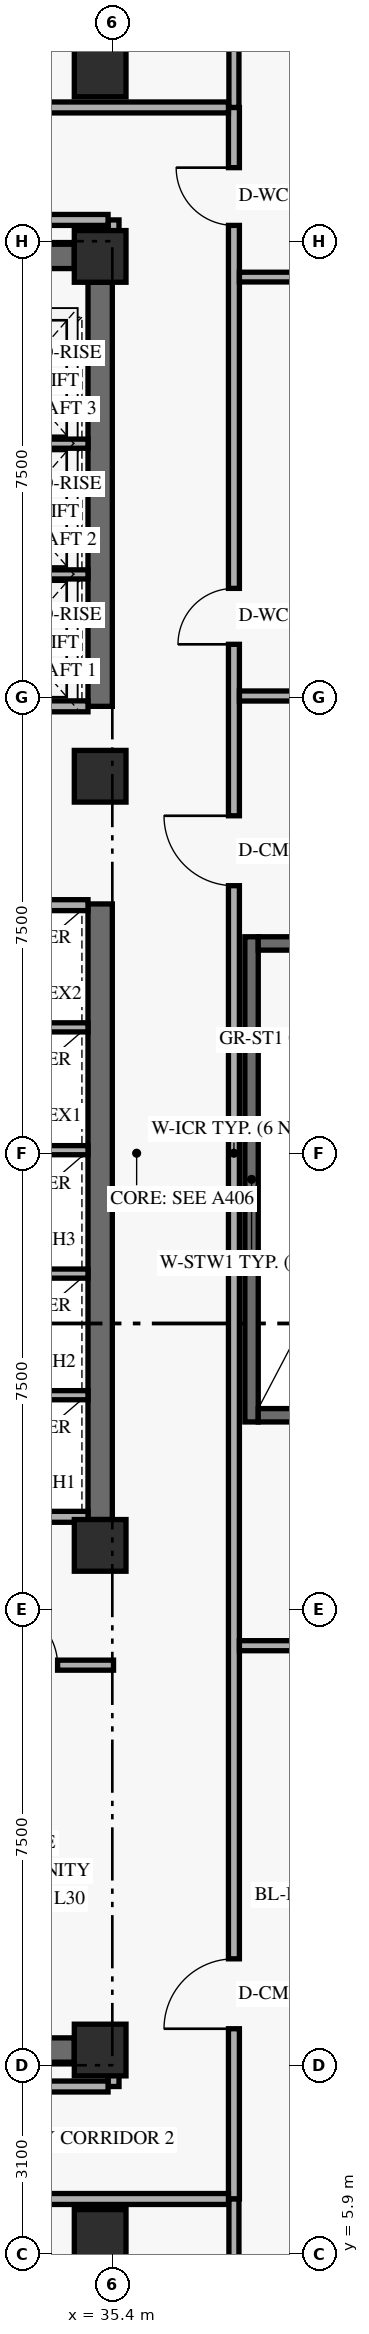
"""IFC4 building model, lengths in metres.
Left out: names, types, materials, properties, quantities, classifications, styles, units other than length and angle.
Written with IfcOpenShell. Run it as: python <this file> out.ifc"""

import sys

from ifc_helpers import new_model, si_unit, direction, frame, frame_2d, origin, origin_2d, place, context, subcontext, project, spatial, rectangle, extrude, element, fill, save


model = new_model("IFC4")
c1 = context("Model", 3, precision=1e-05, world=origin(), true_north=direction((0.0, 1.0)))
c2 = subcontext(c1, "Body", "Model", "MODEL_VIEW")
j1 = project(units=[si_unit("LENGTHUNIT", "METRE"), si_unit("PLANEANGLEUNIT", "RADIAN")], contexts=[c1])
p1 = place(None, origin())
s1 = spatial("IfcSite", under=j1, at=p1, CompositionType="ELEMENT")
p2 = place(p1, origin())
s2 = spatial("IfcBuilding", under=s1, at=p2, CompositionType="ELEMENT")
p3 = place(p2, frame((0.0, 0.0, 117.0)))
s3 = spatial("IfcBuildingStorey", under=s2, at=p3, CompositionType="ELEMENT", Elevation=117.0)
p4 = place(p3, frame((35.2, 17.975, 0.0), z_axis=(0.0, 0.0, 1.0), x_axis=(0.0, 1.0, 0.0)))
e1 = element("IfcWall", 1, at=p4, inside=s3, PredefinedType="SHEAR", context=c2, shape_type="SweptSolid", body=[
    extrude(rectangle(XDim=10.125, YDim=0.4, at=frame_2d((5.062, 0.0))), origin(), (0.0, 0.0, 1.0), 3.349),
])
p5 = place(p3, frame((35.2, 31.35, 0.0), z_axis=(0.0, 0.0, 1.0), x_axis=(0.0, 1.0, 0.0)))
e2 = element("IfcWall", 2, at=p5, inside=s3, PredefinedType="SHEAR", context=c2, shape_type="SweptSolid", body=[
    extrude(rectangle(XDim=6.975, YDim=0.4, at=frame_2d((3.487, 0.0))), origin(), (0.0, 0.0, 1.0), 3.349),
])
for number, where, z_axis, x_axis in (
    (3, (24.625, 9.25, 0.0), (0.0, 0.0, 1.0), (1.0, 0.0, 0.0)),
    (4, (24.625, 38.75, 0.0), (0.0, 0.0, 1.0), (1.0, 0.0, 0.0)),
):
    element("IfcWall", number, at=place(p3, frame(where, z_axis=z_axis, x_axis=x_axis)), inside=s3, PredefinedType="SHEAR", context=c2, shape_type="SweptSolid", body=[
        extrude(rectangle(XDim=10.15, YDim=0.4, at=frame_2d((5.075, 0.0))), origin(), (0.0, 0.0, 1.0), 3.96),
    ])
p6 = place(p3, frame((37.69, 19.58, 0.0), z_axis=(0.0, 0.0, 1.0), x_axis=(0.0, 1.0, 0.0)))
e5 = element("IfcWall", 5, at=p6, inside=s3, PredefinedType="SHEAR", context=c2, shape_type="SweptSolid", body=[
    extrude(rectangle(XDim=7.98, YDim=0.22, at=frame_2d((3.99, 0.0))), origin(), (0.0, 0.0, 1.0), 3.96),
])
p7 = place(p3, frame((37.8, 19.69, 0.0), z_axis=(0.0, 0.0, 1.0), x_axis=(1.0, 0.0, 0.0)))
e6 = element("IfcWall", 6, at=p7, inside=s3, PredefinedType="SHEAR", context=c2, shape_type="SweptSolid", body=[
    extrude(rectangle(XDim=3.16, YDim=0.22, at=frame_2d((1.58, 0.0))), origin(), (0.0, 0.0, 1.0), 3.96),
])
p8 = place(p3, frame((37.8, 27.45, 0.0), z_axis=(0.0, 0.0, 1.0), x_axis=(1.0, 0.0, 0.0)))
e7 = element("IfcWall", 7, at=p8, inside=s3, PredefinedType="SHEAR", context=c2, shape_type="SweptSolid", body=[
    extrude(rectangle(XDim=3.16, YDim=0.22, at=frame_2d((1.58, 0.0))), origin(), (0.0, 0.0, 1.0), 3.96),
])
p9 = place(p8, frame((0.85, 0.0, 0.0)))
e8 = element("IfcOpeningElement", 8, at=p9, cuts=e7, PredefinedType="OPENING", context=c2, shape_type="SweptSolid", body=[
    extrude(rectangle(XDim=1.05, YDim=2.15, at=frame_2d((0.525, 1.075))), frame((0.0, 0.12, 0.0), z_axis=(0.0, -1.0, 0.0), x_axis=(1.0, 0.0, 0.0)), (0.0, 0.0, 1.0), 0.24),
])
for number, where, z_axis, x_axis in (
    (9, (35.2, 6.2, 0.0), (0.0, 0.0, 1.0), (1.0, 0.0, 0.0)),
    (10, (35.2, 9.25, 0.0), (0.0, 0.0, 1.0), (1.0, 0.0, 0.0)),
    (11, (35.2, 17.55, 0.0), (0.0, 0.0, 1.0), (1.0, 0.0, 0.0)),
    (12, (35.2, 30.2, 0.0), (0.0, 0.0, 1.0), (1.0, 0.0, 0.0)),
    (13, (35.2, 38.75, 0.0), (0.0, 0.0, 1.0), (1.0, 0.0, 0.0)),
    (14, (35.2, 41.8, 0.0), (0.0, 0.0, 1.0), (1.0, 0.0, 0.0)),
):
    element("IfcColumn", number, at=place(p3, frame(where, z_axis=z_axis, x_axis=x_axis)), inside=s3, PredefinedType="COLUMN", context=c2, shape_type="SweptSolid", body=[
        extrude(rectangle(XDim=0.85, YDim=0.85, at=origin_2d()), origin(), (0.0, 0.0, 1.0), 4.2),
    ])
for number, where, z_axis, x_axis in (
    (15, (32.74, 18.02, 0.0), (0.0, 0.0, 1.0), (1.0, 0.0, 0.0)),
    (16, (32.74, 28.08, 0.0), (0.0, 0.0, 1.0), (1.0, 0.0, 0.0)),
):
    element("IfcWall", number, at=place(p3, frame(where, z_axis=z_axis, x_axis=x_axis)), inside=s3, PredefinedType="STANDARD", context=c2, shape_type="SweptSolid", body=[
        extrude(rectangle(XDim=2.26, YDim=0.18, at=frame_2d((1.13, 0.0))), origin(), (0.0, 0.0, 1.0), 3.96),
    ])
for number, where, z_axis, x_axis in (
    (17, (32.74, 20.02, 0.0), (0.0, 0.0, 1.0), (1.0, 0.0, 0.0)),
    (18, (32.74, 22.02, 0.0), (0.0, 0.0, 1.0), (1.0, 0.0, 0.0)),
    (19, (32.74, 24.05, 0.0), (0.0, 0.0, 1.0), (1.0, 0.0, 0.0)),
    (20, (32.74, 26.07, 0.0), (0.0, 0.0, 1.0), (1.0, 0.0, 0.0)),
):
    element("IfcWall", number, at=place(p3, frame(where, z_axis=z_axis, x_axis=x_axis)), inside=s3, PredefinedType="STANDARD", context=c2, shape_type="SweptSolid", body=[
        extrude(rectangle(XDim=2.26, YDim=0.15, at=frame_2d((1.13, 0.0))), origin(), (0.0, 0.0, 1.0), 3.96),
    ])
p10 = place(p3, frame((32.74, 31.35, 0.0), z_axis=(0.0, 0.0, 1.0), x_axis=(1.0, 0.0, 0.0)))
e21 = element("IfcWall", 21, at=p10, inside=s3, PredefinedType="STANDARD", context=c2, shape_type="SweptSolid", body=[
    extrude(rectangle(XDim=2.26, YDim=0.18, at=frame_2d((1.13, 0.0))), origin(), (0.0, 0.0, 1.0), 3.96),
])
for number, where, z_axis, x_axis in (
    (22, (32.74, 33.52, 0.0), (0.0, 0.0, 1.0), (1.0, 0.0, 0.0)),
    (23, (32.74, 35.67, 0.0), (0.0, 0.0, 1.0), (1.0, 0.0, 0.0)),
):
    element("IfcWall", number, at=place(p3, frame(where, z_axis=z_axis, x_axis=x_axis)), inside=s3, PredefinedType="STANDARD", context=c2, shape_type="SweptSolid", body=[
        extrude(rectangle(XDim=2.26, YDim=0.15, at=frame_2d((1.13, 0.0))), origin(), (0.0, 0.0, 1.0), 3.96),
    ])
p11 = place(p3, frame((37.4, 6.8, 0.0), z_axis=(0.0, 0.0, 1.0), x_axis=(0.0, 1.0, 0.0)))
e24 = element("IfcWall", 24, at=p11, inside=s3, PredefinedType="STANDARD", context=c2, shape_type="SweptSolid", body=[
    extrude(rectangle(XDim=34.4, YDim=0.18, at=frame_2d((17.2, 0.0))), origin(), (0.0, 0.0, 1.0), 3.331),
])
p12 = place(p11, frame((25.57, 0.0, 0.0)))
e25 = element("IfcOpeningElement", 25, at=p12, cuts=e24, PredefinedType="OPENING", context=c2, shape_type="SweptSolid", body=[
    extrude(rectangle(XDim=0.92, YDim=2.14, at=frame_2d((0.46, 1.07))), frame((0.0, 0.1, 0.0), z_axis=(0.0, -1.0, 0.0), x_axis=(1.0, 0.0, 0.0)), (0.0, 0.0, 1.0), 0.2),
])
p13 = place(p11, frame((32.46, 0.0, 0.0)))
e26 = element("IfcOpeningElement", 26, at=p13, cuts=e24, PredefinedType="OPENING", context=c2, shape_type="SweptSolid", body=[
    extrude(rectangle(XDim=0.95, YDim=2.14, at=frame_2d((0.475, 1.07))), frame((0.0, 0.1, 0.0), z_axis=(0.0, -1.0, 0.0), x_axis=(1.0, 0.0, 0.0)), (0.0, 0.0, 1.0), 0.2),
])
p14 = place(p11, frame((2.8, 0.0, 0.0)))
e27 = element("IfcOpeningElement", 27, at=p14, cuts=e24, PredefinedType="OPENING", context=c2, shape_type="SweptSolid", body=[
    extrude(rectangle(XDim=1.15, YDim=2.15, at=frame_2d((0.575, 1.075))), frame((0.0, 0.1, 0.0), z_axis=(0.0, -1.0, 0.0), x_axis=(1.0, 0.0, 0.0)), (0.0, 0.0, 1.0), 0.2),
])
p15 = place(p11, frame((21.6, 0.0, 0.0)))
e28 = element("IfcOpeningElement", 28, at=p15, cuts=e24, PredefinedType="OPENING", context=c2, shape_type="SweptSolid", body=[
    extrude(rectangle(XDim=1.15, YDim=2.15, at=frame_2d((0.575, 1.075))), frame((0.0, 0.1, 0.0), z_axis=(0.0, -1.0, 0.0), x_axis=(1.0, 0.0, 0.0)), (0.0, 0.0, 1.0), 0.2),
])
for number, where, z_axis, x_axis in (
    (29, (37.4, 2.98, 0.0), (0.0, 0.0, 1.0), (0.0, 1.0, 0.0)),
    (30, (37.4, 41.2, 0.0), (0.0, 0.0, 1.0), (0.0, 1.0, 0.0)),
):
    element("IfcWall", number, at=place(p3, frame(where, z_axis=z_axis, x_axis=x_axis)), inside=s3, PredefinedType="PARTITIONING", context=c2, shape_type="SweptSolid", body=[
        extrude(rectangle(XDim=3.82, YDim=0.165, at=frame_2d((1.91, 0.0))), origin(), (0.0, 0.0, 1.0), 3.409),
    ])
for number, where, z_axis, x_axis in (
    (31, (35.42, 8.65, 0.0), (0.0, 0.0, 1.0), (0.0, 1.0, 0.0)),
    (32, (35.42, 38.75, 0.0), (0.0, 0.0, 1.0), (0.0, 1.0, 0.0)),
):
    element("IfcWall", number, at=place(p3, frame(where, z_axis=z_axis, x_axis=x_axis)), inside=s3, PredefinedType="STANDARD", context=c2, shape_type="SweptSolid", body=[
        extrude(rectangle(XDim=0.6, YDim=0.18, at=frame_2d((0.3, 0.0))), origin(), (0.0, 0.0, 1.0), 3.331),
    ])
for number, where, z_axis, x_axis in (
    (33, (37.49, 15.9, 0.0), (0.0, 0.0, 1.0), (1.0, 0.0, 0.0)),
    (34, (37.49, 31.52, 0.0), (0.0, 0.0, 1.0), (1.0, 0.0, 0.0)),
):
    element("IfcWall", number, at=place(p3, frame(where, z_axis=z_axis, x_axis=x_axis)), inside=s3, PredefinedType="PARTITIONING", context=c2, shape_type="SweptSolid", body=[
        extrude(rectangle(XDim=15.83, YDim=0.165, at=frame_2d((7.915, 0.0))), origin(), (0.0, 0.0, 1.0), 3.331),
    ])
p16 = place(p3, frame((37.49, 38.41, 0.0), z_axis=(0.0, 0.0, 1.0), x_axis=(1.0, 0.0, 0.0)))
e35 = element("IfcWall", 35, at=p16, inside=s3, PredefinedType="PLUMBINGWALL", context=c2, shape_type="SweptSolid", body=[
    extrude(rectangle(XDim=5.93, YDim=0.16, at=frame_2d((2.965, 0.0))), origin(), (0.0, 0.0, 1.0), 3.96),
])
p17 = place(p3, frame((32.732, 15.58, 0.0), z_axis=(0.0, 0.0, 1.0), x_axis=(1.0, 0.0, 0.0)))
e36 = element("IfcWall", 36, at=p17, inside=s3, PredefinedType="PARTITIONING", context=c2, shape_type="SweptSolid", body=[
    extrude(rectangle(XDim=2.688, YDim=0.165, at=frame_2d((1.344, 0.0))), origin(), (0.0, 0.0, 1.0), 3.331),
])
p18 = place(p17, frame((0.817, 0.0, 0.0)))
e37 = element("IfcOpeningElement", 37, at=p18, cuts=e36, PredefinedType="OPENING", context=c2, shape_type="SweptSolid", body=[
    extrude(rectangle(XDim=0.95, YDim=2.15, at=frame_2d((0.475, 1.075))), frame((0.0, 0.093, 0.0), z_axis=(0.0, -1.0, 0.0), x_axis=(1.0, 0.0, 0.0)), (0.0, 0.0, 1.0), 0.185),
])
p19 = place(p3, frame((21.74, 6.8, 0.0), z_axis=(0.0, 0.0, 1.0), x_axis=(1.0, 0.0, 0.0)))
e38 = element("IfcWall", 38, at=p19, inside=s3, PredefinedType="STANDARD", context=c2, shape_type="SweptSolid", body=[
    extrude(rectangle(XDim=15.57, YDim=0.18, at=frame_2d((7.785, 0.0))), origin(), (0.0, 0.0, 1.0), 3.331),
])
p20 = place(p19, frame((5.41, 0.0, 0.0)))
e39 = element("IfcOpeningElement", 39, at=p20, cuts=e38, PredefinedType="OPENING", context=c2, shape_type="SweptSolid", body=[
    extrude(rectangle(XDim=0.95, YDim=2.15, at=frame_2d((0.475, 1.075))), frame((0.0, 0.1, 0.0), z_axis=(0.0, -1.0, 0.0), x_axis=(1.0, 0.0, 0.0)), (0.0, 0.0, 1.0), 0.2),
])
p21 = place(p3, frame((23.85, 8.65, 0.0), z_axis=(0.0, 0.0, 1.0), x_axis=(1.0, 0.0, 0.0)))
e40 = element("IfcWall", 40, at=p21, inside=s3, PredefinedType="STANDARD", context=c2, shape_type="SweptSolid", body=[
    extrude(rectangle(XDim=11.48, YDim=0.18, at=frame_2d((5.74, 0.0))), origin(), (0.0, 0.0, 1.0), 3.331),
])
p22 = place(p3, frame((21.74, 41.2, 0.0), z_axis=(0.0, 0.0, 1.0), x_axis=(1.0, 0.0, 0.0)))
e41 = element("IfcWall", 41, at=p22, inside=s3, PredefinedType="STANDARD", context=c2, shape_type="SweptSolid", body=[
    extrude(rectangle(XDim=15.57, YDim=0.18, at=frame_2d((7.785, 0.0))), origin(), (0.0, 0.0, 1.0), 3.331),
])
p23 = place(p22, frame((5.41, 0.0, 0.0)))
e42 = element("IfcOpeningElement", 42, at=p23, cuts=e41, PredefinedType="OPENING", context=c2, shape_type="SweptSolid", body=[
    extrude(rectangle(XDim=0.95, YDim=2.15, at=frame_2d((0.475, 1.075))), frame((0.0, 0.1, 0.0), z_axis=(0.0, -1.0, 0.0), x_axis=(1.0, 0.0, 0.0)), (0.0, 0.0, 1.0), 0.2),
])
p24 = place(p3, frame((23.85, 39.35, 0.0), z_axis=(0.0, 0.0, 1.0), x_axis=(1.0, 0.0, 0.0)))
e43 = element("IfcWall", 43, at=p24, inside=s3, PredefinedType="STANDARD", context=c2, shape_type="SweptSolid", body=[
    extrude(rectangle(XDim=11.48, YDim=0.18, at=frame_2d((5.74, 0.0))), origin(), (0.0, 0.0, 1.0), 3.331),
])
p25 = place(p12, origin())
e44 = element("IfcDoor", 44, at=p25, inside=s3, OperationType="SINGLE_SWING_LEFT", PredefinedType="DOOR", context=c2, shape_type="SweptSolid", body=[
    extrude(rectangle(XDim=0.92, YDim=2.14, at=frame_2d((0.46, 1.07))), frame((0.0, 0.025, 0.0), z_axis=(0.0, -1.0, 0.0), x_axis=(1.0, 0.0, 0.0)), (0.0, 0.0, 1.0), 0.05),
])
fill(e25, e44)
p26 = place(p13, origin())
e45 = element("IfcDoor", 45, at=p26, inside=s3, OperationType="SINGLE_SWING_RIGHT", PredefinedType="DOOR", context=c2, shape_type="SweptSolid", body=[
    extrude(rectangle(XDim=0.95, YDim=2.14, at=frame_2d((0.475, 1.07))), frame((0.0, 0.025, 0.0), z_axis=(0.0, -1.0, 0.0), x_axis=(1.0, 0.0, 0.0)), (0.0, 0.0, 1.0), 0.05),
])
fill(e26, e45)
p27 = place(p18, origin())
e46 = element("IfcDoor", 46, at=p27, inside=s3, OperationType="SINGLE_SWING_LEFT", PredefinedType="DOOR", context=c2, shape_type="SweptSolid", body=[
    extrude(rectangle(XDim=0.95, YDim=2.15, at=frame_2d((0.475, 1.075))), frame((0.0, 0.025, 0.0), z_axis=(0.0, -1.0, 0.0), x_axis=(1.0, 0.0, 0.0)), (0.0, 0.0, 1.0), 0.05),
])
fill(e37, e46)
p28 = place(p14, origin())
e47 = element("IfcDoor", 47, at=p28, inside=s3, OperationType="SINGLE_SWING_LEFT", PredefinedType="DOOR", context=c2, shape_type="SweptSolid", body=[
    extrude(rectangle(XDim=1.15, YDim=2.15, at=frame_2d((0.575, 1.075))), frame((0.0, 0.025, 0.0), z_axis=(0.0, -1.0, 0.0), x_axis=(1.0, 0.0, 0.0)), (0.0, 0.0, 1.0), 0.05),
])
fill(e27, e47)
p29 = place(p15, origin())
e48 = element("IfcDoor", 48, at=p29, inside=s3, OperationType="SINGLE_SWING_RIGHT", PredefinedType="DOOR", context=c2, shape_type="SweptSolid", body=[
    extrude(rectangle(XDim=1.15, YDim=2.15, at=frame_2d((0.575, 1.075))), frame((0.0, 0.025, 0.0), z_axis=(0.0, -1.0, 0.0), x_axis=(1.0, 0.0, 0.0)), (0.0, 0.0, 1.0), 0.05),
])
fill(e28, e48)
save(model, sys.argv[1])
